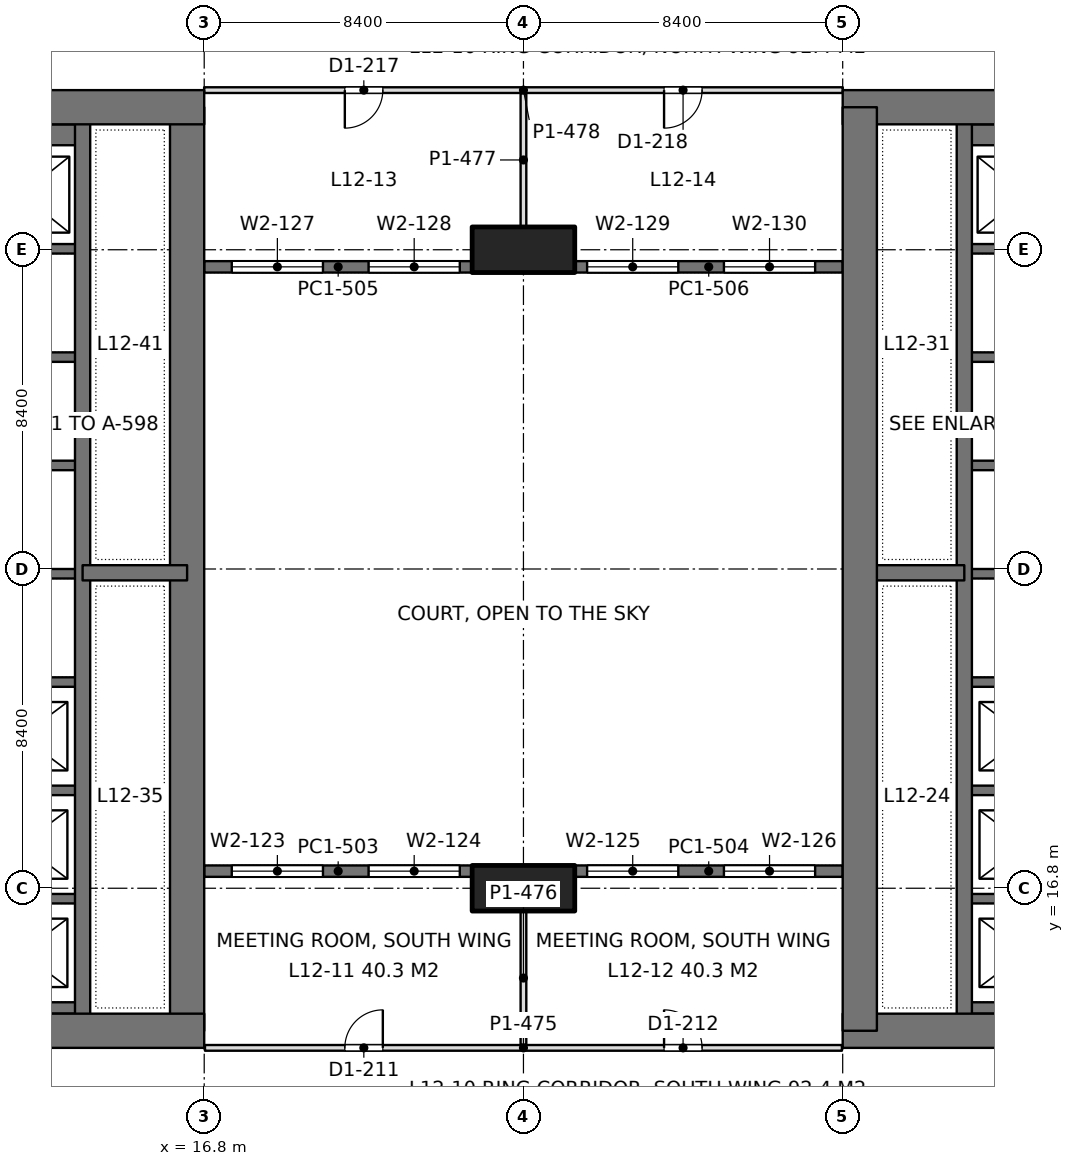
"""IFC4 building model, lengths in metres.
Left out: names, types, materials, properties, quantities, classifications, styles, units other than length and angle.
Written with IfcOpenShell. Run it as: python <this file> out.ifc"""

import sys

from ifc_helpers import new_model, si_unit, direction, frame, frame_2d, origin, origin_2d, place, context, subcontext, project, spatial, rectangle, extrude, element, fill, save


model = new_model("IFC4")
c1 = context("Model", 3, precision=1e-05, world=origin(), true_north=direction((0.0, 1.0)))
c2 = subcontext(c1, "Body", "Model", "MODEL_VIEW")
j1 = project(units=[si_unit("LENGTHUNIT", "METRE"), si_unit("PLANEANGLEUNIT", "RADIAN")], contexts=[c1])
p1 = place(None, origin())
s1 = spatial("IfcSite", under=j1, at=p1, CompositionType="ELEMENT")
p2 = place(p1, origin())
s2 = spatial("IfcBuilding", under=s1, at=p2, CompositionType="ELEMENT")
p3 = place(p2, frame((0.0, 0.0, 54.9)))
s3 = spatial("IfcBuildingStorey", under=s2, at=p3, CompositionType="ELEMENT", Elevation=54.9)
for number, where, z_axis, x_axis in (
    (1, (25.2, 16.8, 0.0), (0.0, 0.0, 1.0), (1.0, 0.0, 0.0)),
    (2, (25.2, 33.6, 0.0), (0.0, 0.0, 1.0), (1.0, 0.0, 0.0)),
):
    element("IfcColumn", number, at=place(p3, frame(where, z_axis=z_axis, x_axis=x_axis)), inside=s3, PredefinedType="COLUMN", context=c2, shape_type="SweptSolid", body=[
        extrude(rectangle(XDim=2.7, YDim=1.2, at=origin_2d()), origin(), (0.0, 0.0, 1.0), 4.5),
    ])
p4 = place(p3, frame((-1.2, 13.05, 0.0), z_axis=(0.0, 0.0, 1.0), x_axis=(1.0, 0.0, 0.0)))
e3 = element("IfcWall", 3, at=p4, inside=s3, PredefinedType="SHEAR", context=c2, shape_type="SweptSolid", body=[
    extrude(rectangle(XDim=18.0, YDim=0.9, at=frame_2d((9.0, 0.0))), origin(), (0.0, 0.0, 1.0), 4.5),
])
p5 = place(p4, frame((8.95, 0.0, 0.0)))
e4 = element("IfcOpeningElement", 4, at=p5, cuts=e3, PredefinedType="OPENING", context=c2, shape_type="SweptSolid", body=[
    extrude(rectangle(XDim=1.8, YDim=2.4, at=frame_2d((0.9, 1.2))), frame((0.0, 0.46, 0.0), z_axis=(0.0, -1.0, 0.0), x_axis=(1.0, 0.0, 0.0)), (0.0, 0.0, 1.0), 0.92),
])
p6 = place(p3, frame((-1.2, 37.35, 0.0), z_axis=(0.0, 0.0, 1.0), x_axis=(1.0, 0.0, 0.0)))
e5 = element("IfcWall", 5, at=p6, inside=s3, PredefinedType="SHEAR", context=c2, shape_type="SweptSolid", body=[
    extrude(rectangle(XDim=18.0, YDim=0.9, at=frame_2d((9.0, 0.0))), origin(), (0.0, 0.0, 1.0), 4.5),
])
p7 = place(p6, frame((8.95, 0.0, 0.0)))
e6 = element("IfcOpeningElement", 6, at=p7, cuts=e5, PredefinedType="OPENING", context=c2, shape_type="SweptSolid", body=[
    extrude(rectangle(XDim=1.8, YDim=2.4, at=frame_2d((0.9, 1.2))), frame((0.0, 0.46, 0.0), z_axis=(0.0, -1.0, 0.0), x_axis=(1.0, 0.0, 0.0)), (0.0, 0.0, 1.0), 0.92),
])
p8 = place(p3, frame((16.35, 13.05, 0.0), z_axis=(0.0, 0.0, 1.0), x_axis=(0.0, 1.0, 0.0)))
e7 = element("IfcWall", 7, at=p8, inside=s3, PredefinedType="SHEAR", context=c2, shape_type="SweptSolid", body=[
    extrude(rectangle(XDim=24.3, YDim=0.9, at=frame_2d((12.15, 0.0))), origin(), (0.0, 0.0, 1.0), 4.5),
])
p9 = place(p3, frame((13.6, 13.05, 0.0), z_axis=(0.0, 0.0, 1.0), x_axis=(0.0, 1.0, 0.0)))
e8 = element("IfcWall", 8, at=p9, inside=s3, PredefinedType="SHEAR", context=c2, shape_type="SweptSolid", body=[
    extrude(rectangle(XDim=24.3, YDim=0.4, at=frame_2d((12.15, 0.0))), origin(), (0.0, 0.0, 1.0), 4.5),
])
p10 = place(p3, frame((13.6, 25.1, 0.0), z_axis=(0.0, 0.0, 1.0), x_axis=(1.0, 0.0, 0.0)))
e9 = element("IfcWall", 9, at=p10, inside=s3, PredefinedType="SHEAR", context=c2, shape_type="SweptSolid", body=[
    extrude(rectangle(XDim=2.75, YDim=0.4, at=frame_2d((1.375, 0.0))), origin(), (0.0, 0.0, 1.0), 4.5),
])
p11 = place(p3, frame((10.4, 13.65, 0.0), z_axis=(0.0, 0.0, 1.0), x_axis=(1.0, 0.0, 0.0)))
e10 = element("IfcWall", 10, at=p11, inside=s3, PredefinedType="SHEAR", context=c2, shape_type="SweptSolid", body=[
    extrude(rectangle(XDim=3.2, YDim=0.3, at=frame_2d((1.6, 0.0))), origin(), (0.0, 0.0, 1.0), 4.5),
])
for number, where, z_axis, x_axis in (
    (11, (10.4, 16.525, 0.0), (0.0, 0.0, 1.0), (1.0, 0.0, 0.0)),
    (12, (10.4, 19.375, 0.0), (0.0, 0.0, 1.0), (1.0, 0.0, 0.0)),
    (13, (10.4, 22.225, 0.0), (0.0, 0.0, 1.0), (1.0, 0.0, 0.0)),
    (14, (10.4, 25.075, 0.0), (0.0, 0.0, 1.0), (1.0, 0.0, 0.0)),
    (15, (10.4, 27.925, 0.0), (0.0, 0.0, 1.0), (1.0, 0.0, 0.0)),
    (16, (10.4, 30.775, 0.0), (0.0, 0.0, 1.0), (1.0, 0.0, 0.0)),
    (17, (10.4, 33.625, 0.0), (0.0, 0.0, 1.0), (1.0, 0.0, 0.0)),
):
    element("IfcWall", number, at=place(p3, frame(where, z_axis=z_axis, x_axis=x_axis)), inside=s3, PredefinedType="SHEAR", context=c2, shape_type="SweptSolid", body=[
        extrude(rectangle(XDim=3.2, YDim=0.25, at=frame_2d((1.6, 0.0))), origin(), (0.0, 0.0, 1.0), 4.5),
    ])
p12 = place(p3, frame((10.4, 36.625, 0.0), z_axis=(0.0, 0.0, 1.0), x_axis=(1.0, 0.0, 0.0)))
e18 = element("IfcWall", 18, at=p12, inside=s3, PredefinedType="SHEAR", context=c2, shape_type="SweptSolid", body=[
    extrude(rectangle(XDim=3.2, YDim=0.55, at=frame_2d((1.6, 0.0))), origin(), (0.0, 0.0, 1.0), 4.5),
])
p13 = place(p3, frame((33.6, 13.05, 0.0), z_axis=(0.0, 0.0, 1.0), x_axis=(1.0, 0.0, 0.0)))
e19 = element("IfcWall", 19, at=p13, inside=s3, PredefinedType="SHEAR", context=c2, shape_type="SweptSolid", body=[
    extrude(rectangle(XDim=18.0, YDim=0.9, at=frame_2d((9.0, 0.0))), origin(), (0.0, 0.0, 1.0), 4.5),
])
p14 = place(p13, frame((7.25, 0.0, 0.0)))
e20 = element("IfcOpeningElement", 20, at=p14, cuts=e19, PredefinedType="OPENING", context=c2, shape_type="SweptSolid", body=[
    extrude(rectangle(XDim=1.8, YDim=2.4, at=frame_2d((0.9, 1.2))), frame((0.0, 0.46, 0.0), z_axis=(0.0, -1.0, 0.0), x_axis=(1.0, 0.0, 0.0)), (0.0, 0.0, 1.0), 0.92),
])
p15 = place(p3, frame((33.6, 37.35, 0.0), z_axis=(0.0, 0.0, 1.0), x_axis=(1.0, 0.0, 0.0)))
e21 = element("IfcWall", 21, at=p15, inside=s3, PredefinedType="SHEAR", context=c2, shape_type="SweptSolid", body=[
    extrude(rectangle(XDim=18.0, YDim=0.9, at=frame_2d((9.0, 0.0))), origin(), (0.0, 0.0, 1.0), 4.5),
])
p16 = place(p15, frame((7.25, 0.0, 0.0)))
e22 = element("IfcOpeningElement", 22, at=p16, cuts=e21, PredefinedType="OPENING", context=c2, shape_type="SweptSolid", body=[
    extrude(rectangle(XDim=1.8, YDim=2.4, at=frame_2d((0.9, 1.2))), frame((0.0, 0.46, 0.0), z_axis=(0.0, -1.0, 0.0), x_axis=(1.0, 0.0, 0.0)), (0.0, 0.0, 1.0), 0.92),
])
p17 = place(p3, frame((34.05, 13.05, 0.0), z_axis=(0.0, 0.0, 1.0), x_axis=(0.0, 1.0, 0.0)))
e23 = element("IfcWall", 23, at=p17, inside=s3, PredefinedType="SHEAR", context=c2, shape_type="SweptSolid", body=[
    extrude(rectangle(XDim=24.3, YDim=0.9, at=frame_2d((12.15, 0.0))), origin(), (0.0, 0.0, 1.0), 4.5),
])
p18 = place(p3, frame((36.8, 13.05, 0.0), z_axis=(0.0, 0.0, 1.0), x_axis=(0.0, 1.0, 0.0)))
e24 = element("IfcWall", 24, at=p18, inside=s3, PredefinedType="SHEAR", context=c2, shape_type="SweptSolid", body=[
    extrude(rectangle(XDim=24.3, YDim=0.4, at=frame_2d((12.15, 0.0))), origin(), (0.0, 0.0, 1.0), 4.5),
])
p19 = place(p3, frame((36.8, 25.1, 0.0), z_axis=(0.0, 0.0, 1.0), x_axis=(-1.0, 0.0, 0.0)))
e25 = element("IfcWall", 25, at=p19, inside=s3, PredefinedType="SHEAR", context=c2, shape_type="SweptSolid", body=[
    extrude(rectangle(XDim=2.75, YDim=0.4, at=frame_2d((1.375, 0.0))), origin(), (0.0, 0.0, 1.0), 4.5),
])
p20 = place(p3, frame((40.0, 13.65, 0.0), z_axis=(0.0, 0.0, 1.0), x_axis=(-1.0, 0.0, 0.0)))
e26 = element("IfcWall", 26, at=p20, inside=s3, PredefinedType="SHEAR", context=c2, shape_type="SweptSolid", body=[
    extrude(rectangle(XDim=3.2, YDim=0.3, at=frame_2d((1.6, 0.0))), origin(), (0.0, 0.0, 1.0), 4.5),
])
for number, where, z_axis, x_axis in (
    (27, (40.0, 16.525, 0.0), (0.0, 0.0, 1.0), (-1.0, 0.0, 0.0)),
    (28, (40.0, 19.375, 0.0), (0.0, 0.0, 1.0), (-1.0, 0.0, 0.0)),
    (29, (40.0, 22.225, 0.0), (0.0, 0.0, 1.0), (-1.0, 0.0, 0.0)),
    (30, (40.0, 25.075, 0.0), (0.0, 0.0, 1.0), (-1.0, 0.0, 0.0)),
    (31, (40.0, 27.925, 0.0), (0.0, 0.0, 1.0), (-1.0, 0.0, 0.0)),
    (32, (40.0, 30.775, 0.0), (0.0, 0.0, 1.0), (-1.0, 0.0, 0.0)),
    (33, (40.0, 33.625, 0.0), (0.0, 0.0, 1.0), (-1.0, 0.0, 0.0)),
):
    element("IfcWall", number, at=place(p3, frame(where, z_axis=z_axis, x_axis=x_axis)), inside=s3, PredefinedType="SHEAR", context=c2, shape_type="SweptSolid", body=[
        extrude(rectangle(XDim=3.2, YDim=0.25, at=frame_2d((1.6, 0.0))), origin(), (0.0, 0.0, 1.0), 4.5),
    ])
p21 = place(p3, frame((40.0, 36.625, 0.0), z_axis=(0.0, 0.0, 1.0), x_axis=(-1.0, 0.0, 0.0)))
e34 = element("IfcWall", 34, at=p21, inside=s3, PredefinedType="SHEAR", context=c2, shape_type="SweptSolid", body=[
    extrude(rectangle(XDim=3.2, YDim=0.55, at=frame_2d((1.6, 0.0))), origin(), (0.0, 0.0, 1.0), 4.5),
])
p22 = place(p3, frame((16.8, 17.25, 0.0), z_axis=(0.0, 0.0, 1.0), x_axis=(1.0, 0.0, 0.0)))
e35 = element("IfcWall", 35, at=p22, inside=s3, PredefinedType="SOLIDWALL", context=c2, shape_type="SweptSolid", body=[
    extrude(rectangle(XDim=7.05, YDim=0.3, at=frame_2d((3.525, 0.0))), origin(), (0.0, 0.0, 1.0), 4.34),
])
p23 = place(p22, frame((0.725, 0.0, 0.9)))
e36 = element("IfcOpeningElement", 36, at=p23, cuts=e35, PredefinedType="OPENING", context=c2, shape_type="SweptSolid", body=[
    extrude(rectangle(XDim=2.4, YDim=1.9, at=frame_2d((1.2, 0.95))), frame((0.0, 0.16, 0.0), z_axis=(0.0, -1.0, 0.0), x_axis=(1.0, 0.0, 0.0)), (0.0, 0.0, 1.0), 0.32),
])
p24 = place(p22, frame((4.325, 0.0, 0.9)))
e37 = element("IfcOpeningElement", 37, at=p24, cuts=e35, PredefinedType="OPENING", context=c2, shape_type="SweptSolid", body=[
    extrude(rectangle(XDim=2.4, YDim=1.9, at=frame_2d((1.2, 0.95))), frame((0.0, 0.16, 0.0), z_axis=(0.0, -1.0, 0.0), x_axis=(1.0, 0.0, 0.0)), (0.0, 0.0, 1.0), 0.32),
])
p25 = place(p3, frame((26.55, 17.25, 0.0), z_axis=(0.0, 0.0, 1.0), x_axis=(1.0, 0.0, 0.0)))
e38 = element("IfcWall", 38, at=p25, inside=s3, PredefinedType="SOLIDWALL", context=c2, shape_type="SweptSolid", body=[
    extrude(rectangle(XDim=7.05, YDim=0.3, at=frame_2d((3.525, 0.0))), origin(), (0.0, 0.0, 1.0), 4.34),
])
p26 = place(p25, frame((0.325, 0.0, 0.9)))
e39 = element("IfcOpeningElement", 39, at=p26, cuts=e38, PredefinedType="OPENING", context=c2, shape_type="SweptSolid", body=[
    extrude(rectangle(XDim=2.4, YDim=1.9, at=frame_2d((1.2, 0.95))), frame((0.0, 0.16, 0.0), z_axis=(0.0, -1.0, 0.0), x_axis=(1.0, 0.0, 0.0)), (0.0, 0.0, 1.0), 0.32),
])
p27 = place(p25, frame((3.925, 0.0, 0.9)))
e40 = element("IfcOpeningElement", 40, at=p27, cuts=e38, PredefinedType="OPENING", context=c2, shape_type="SweptSolid", body=[
    extrude(rectangle(XDim=2.4, YDim=1.9, at=frame_2d((1.2, 0.95))), frame((0.0, 0.16, 0.0), z_axis=(0.0, -1.0, 0.0), x_axis=(1.0, 0.0, 0.0)), (0.0, 0.0, 1.0), 0.32),
])
p28 = place(p3, frame((16.8, 33.15, 0.0), z_axis=(0.0, 0.0, 1.0), x_axis=(1.0, 0.0, 0.0)))
e41 = element("IfcWall", 41, at=p28, inside=s3, PredefinedType="SOLIDWALL", context=c2, shape_type="SweptSolid", body=[
    extrude(rectangle(XDim=7.05, YDim=0.3, at=frame_2d((3.525, 0.0))), origin(), (0.0, 0.0, 1.0), 4.34),
])
p29 = place(p28, frame((0.725, 0.0, 0.9)))
e42 = element("IfcOpeningElement", 42, at=p29, cuts=e41, PredefinedType="OPENING", context=c2, shape_type="SweptSolid", body=[
    extrude(rectangle(XDim=2.4, YDim=1.9, at=frame_2d((1.2, 0.95))), frame((0.0, 0.16, 0.0), z_axis=(0.0, -1.0, 0.0), x_axis=(1.0, 0.0, 0.0)), (0.0, 0.0, 1.0), 0.32),
])
p30 = place(p28, frame((4.325, 0.0, 0.9)))
e43 = element("IfcOpeningElement", 43, at=p30, cuts=e41, PredefinedType="OPENING", context=c2, shape_type="SweptSolid", body=[
    extrude(rectangle(XDim=2.4, YDim=1.9, at=frame_2d((1.2, 0.95))), frame((0.0, 0.16, 0.0), z_axis=(0.0, -1.0, 0.0), x_axis=(1.0, 0.0, 0.0)), (0.0, 0.0, 1.0), 0.32),
])
p31 = place(p3, frame((26.55, 33.15, 0.0), z_axis=(0.0, 0.0, 1.0), x_axis=(1.0, 0.0, 0.0)))
e44 = element("IfcWall", 44, at=p31, inside=s3, PredefinedType="SOLIDWALL", context=c2, shape_type="SweptSolid", body=[
    extrude(rectangle(XDim=7.05, YDim=0.3, at=frame_2d((3.525, 0.0))), origin(), (0.0, 0.0, 1.0), 4.34),
])
p32 = place(p31, frame((0.325, 0.0, 0.9)))
e45 = element("IfcOpeningElement", 45, at=p32, cuts=e44, PredefinedType="OPENING", context=c2, shape_type="SweptSolid", body=[
    extrude(rectangle(XDim=2.4, YDim=1.9, at=frame_2d((1.2, 0.95))), frame((0.0, 0.16, 0.0), z_axis=(0.0, -1.0, 0.0), x_axis=(1.0, 0.0, 0.0)), (0.0, 0.0, 1.0), 0.32),
])
p33 = place(p31, frame((3.925, 0.0, 0.9)))
e46 = element("IfcOpeningElement", 46, at=p33, cuts=e44, PredefinedType="OPENING", context=c2, shape_type="SweptSolid", body=[
    extrude(rectangle(XDim=2.4, YDim=1.9, at=frame_2d((1.2, 0.95))), frame((0.0, 0.16, 0.0), z_axis=(0.0, -1.0, 0.0), x_axis=(1.0, 0.0, 0.0)), (0.0, 0.0, 1.0), 0.32),
])
p34 = place(p3, frame((25.2, 12.674, 0.0), z_axis=(0.0, 0.0, 1.0), x_axis=(0.0, 1.0, 0.0)))
e47 = element("IfcWall", 47, at=p34, inside=s3, PredefinedType="PARTITIONING", context=c2, shape_type="SweptSolid", body=[
    extrude(rectangle(XDim=3.527, YDim=0.15, at=frame_2d((1.763, 0.0))), origin(), (0.0, 0.0, 1.0), 3.74),
])
p35 = place(p3, frame((16.82, 12.6, 0.0), z_axis=(0.0, 0.0, 1.0), x_axis=(1.0, 0.0, 0.0)))
e48 = element("IfcWall", 48, at=p35, inside=s3, PredefinedType="PARTITIONING", context=c2, shape_type="SweptSolid", body=[
    extrude(rectangle(XDim=16.76, YDim=0.15, at=frame_2d((8.38, 0.0))), origin(), (0.0, 0.0, 1.0), 3.74),
])
p36 = place(p35, frame((3.68, 0.0, 0.0)))
e49 = element("IfcOpeningElement", 49, at=p36, cuts=e48, PredefinedType="OPENING", context=c2, shape_type="SweptSolid", body=[
    extrude(rectangle(XDim=1.0, YDim=2.2, at=frame_2d((0.5, 1.1))), frame((0.0, 0.085, 0.0), z_axis=(0.0, -1.0, 0.0), x_axis=(1.0, 0.0, 0.0)), (0.0, 0.0, 1.0), 0.17),
])
p37 = place(p35, frame((12.08, 0.0, 0.0)))
e50 = element("IfcOpeningElement", 50, at=p37, cuts=e48, PredefinedType="OPENING", context=c2, shape_type="SweptSolid", body=[
    extrude(rectangle(XDim=1.0, YDim=2.2, at=frame_2d((0.5, 1.1))), frame((0.0, 0.085, 0.0), z_axis=(0.0, -1.0, 0.0), x_axis=(1.0, 0.0, 0.0)), (0.0, 0.0, 1.0), 0.17),
])
p38 = place(p3, frame((25.2, 34.199, 0.0), z_axis=(0.0, 0.0, 1.0), x_axis=(0.0, 1.0, 0.0)))
e51 = element("IfcWall", 51, at=p38, inside=s3, PredefinedType="PARTITIONING", context=c2, shape_type="SweptSolid", body=[
    extrude(rectangle(XDim=3.527, YDim=0.15, at=frame_2d((1.764, 0.0))), origin(), (0.0, 0.0, 1.0), 3.74),
])
p39 = place(p3, frame((16.798, 37.8, 0.0), z_axis=(0.0, 0.0, 1.0), x_axis=(1.0, 0.0, 0.0)))
e52 = element("IfcWall", 52, at=p39, inside=s3, PredefinedType="PARTITIONING", context=c2, shape_type="SweptSolid", body=[
    extrude(rectangle(XDim=16.804, YDim=0.15, at=frame_2d((8.402, 0.0))), origin(), (0.0, 0.0, 1.0), 3.74),
])
p40 = place(p39, frame((3.702, 0.0, 0.0)))
e53 = element("IfcOpeningElement", 53, at=p40, cuts=e52, PredefinedType="OPENING", context=c2, shape_type="SweptSolid", body=[
    extrude(rectangle(XDim=1.0, YDim=2.2, at=frame_2d((0.5, 1.1))), frame((0.0, 0.085, 0.0), z_axis=(0.0, -1.0, 0.0), x_axis=(1.0, 0.0, 0.0)), (0.0, 0.0, 1.0), 0.17),
])
p41 = place(p39, frame((12.102, 0.0, 0.0)))
e54 = element("IfcOpeningElement", 54, at=p41, cuts=e52, PredefinedType="OPENING", context=c2, shape_type="SweptSolid", body=[
    extrude(rectangle(XDim=1.0, YDim=2.2, at=frame_2d((0.5, 1.1))), frame((0.0, 0.085, 0.0), z_axis=(0.0, -1.0, 0.0), x_axis=(1.0, 0.0, 0.0)), (0.0, 0.0, 1.0), 0.17),
])
p42 = place(p23, origin())
e55 = element("IfcWindow", 55, at=p42, inside=s3, PartitioningType="SINGLE_PANEL", PredefinedType="WINDOW", context=c2, shape_type="SweptSolid", body=[
    extrude(rectangle(XDim=2.4, YDim=1.9, at=frame_2d((1.2, 0.95))), frame((0.0, 0.03, 0.0), z_axis=(0.0, -1.0, 0.0), x_axis=(1.0, 0.0, 0.0)), (0.0, 0.0, 1.0), 0.06),
])
fill(e36, e55)
p43 = place(p24, origin())
e56 = element("IfcWindow", 56, at=p43, inside=s3, PartitioningType="SINGLE_PANEL", PredefinedType="WINDOW", context=c2, shape_type="SweptSolid", body=[
    extrude(rectangle(XDim=2.4, YDim=1.9, at=frame_2d((1.2, 0.95))), frame((0.0, 0.03, 0.0), z_axis=(0.0, -1.0, 0.0), x_axis=(1.0, 0.0, 0.0)), (0.0, 0.0, 1.0), 0.06),
])
fill(e37, e56)
p44 = place(p26, origin())
e57 = element("IfcWindow", 57, at=p44, inside=s3, PartitioningType="SINGLE_PANEL", PredefinedType="WINDOW", context=c2, shape_type="SweptSolid", body=[
    extrude(rectangle(XDim=2.4, YDim=1.9, at=frame_2d((1.2, 0.95))), frame((0.0, 0.03, 0.0), z_axis=(0.0, -1.0, 0.0), x_axis=(1.0, 0.0, 0.0)), (0.0, 0.0, 1.0), 0.06),
])
fill(e39, e57)
p45 = place(p27, origin())
e58 = element("IfcWindow", 58, at=p45, inside=s3, PartitioningType="SINGLE_PANEL", PredefinedType="WINDOW", context=c2, shape_type="SweptSolid", body=[
    extrude(rectangle(XDim=2.4, YDim=1.9, at=frame_2d((1.2, 0.95))), frame((0.0, 0.03, 0.0), z_axis=(0.0, -1.0, 0.0), x_axis=(1.0, 0.0, 0.0)), (0.0, 0.0, 1.0), 0.06),
])
fill(e40, e58)
p46 = place(p29, origin())
e59 = element("IfcWindow", 59, at=p46, inside=s3, PartitioningType="SINGLE_PANEL", PredefinedType="WINDOW", context=c2, shape_type="SweptSolid", body=[
    extrude(rectangle(XDim=2.4, YDim=1.9, at=frame_2d((1.2, 0.95))), frame((0.0, 0.03, 0.0), z_axis=(0.0, -1.0, 0.0), x_axis=(1.0, 0.0, 0.0)), (0.0, 0.0, 1.0), 0.06),
])
fill(e42, e59)
p47 = place(p30, origin())
e60 = element("IfcWindow", 60, at=p47, inside=s3, PartitioningType="SINGLE_PANEL", PredefinedType="WINDOW", context=c2, shape_type="SweptSolid", body=[
    extrude(rectangle(XDim=2.4, YDim=1.9, at=frame_2d((1.2, 0.95))), frame((0.0, 0.03, 0.0), z_axis=(0.0, -1.0, 0.0), x_axis=(1.0, 0.0, 0.0)), (0.0, 0.0, 1.0), 0.06),
])
fill(e43, e60)
p48 = place(p32, origin())
e61 = element("IfcWindow", 61, at=p48, inside=s3, PartitioningType="SINGLE_PANEL", PredefinedType="WINDOW", context=c2, shape_type="SweptSolid", body=[
    extrude(rectangle(XDim=2.4, YDim=1.9, at=frame_2d((1.2, 0.95))), frame((0.0, 0.03, 0.0), z_axis=(0.0, -1.0, 0.0), x_axis=(1.0, 0.0, 0.0)), (0.0, 0.0, 1.0), 0.06),
])
fill(e45, e61)
p49 = place(p33, origin())
e62 = element("IfcWindow", 62, at=p49, inside=s3, PartitioningType="SINGLE_PANEL", PredefinedType="WINDOW", context=c2, shape_type="SweptSolid", body=[
    extrude(rectangle(XDim=2.4, YDim=1.9, at=frame_2d((1.2, 0.95))), frame((0.0, 0.03, 0.0), z_axis=(0.0, -1.0, 0.0), x_axis=(1.0, 0.0, 0.0)), (0.0, 0.0, 1.0), 0.06),
])
fill(e46, e62)
p50 = place(p36, origin())
e63 = element("IfcDoor", 63, at=p50, inside=s3, OperationType="SINGLE_SWING_RIGHT", PredefinedType="DOOR", context=c2, shape_type="SweptSolid", body=[
    extrude(rectangle(XDim=1.0, YDim=2.2, at=frame_2d((0.5, 1.1))), frame((0.0, 0.025, 0.0), z_axis=(0.0, -1.0, 0.0), x_axis=(1.0, 0.0, 0.0)), (0.0, 0.0, 1.0), 0.05),
])
fill(e49, e63)
p51 = place(p37, origin())
e64 = element("IfcDoor", 64, at=p51, inside=s3, OperationType="SINGLE_SWING_LEFT", PredefinedType="DOOR", context=c2, shape_type="SweptSolid", body=[
    extrude(rectangle(XDim=1.0, YDim=2.2, at=frame_2d((0.5, 1.1))), frame((0.0, 0.025, 0.0), z_axis=(0.0, -1.0, 0.0), x_axis=(1.0, 0.0, 0.0)), (0.0, 0.0, 1.0), 0.05),
])
fill(e50, e64)
p52 = place(p40, frame((1.0, 0.0, 0.0), z_axis=(0.0, 0.0, 1.0), x_axis=(-1.0, 0.0, 0.0)))
e65 = element("IfcDoor", 65, at=p52, inside=s3, OperationType="SINGLE_SWING_RIGHT", PredefinedType="DOOR", context=c2, shape_type="SweptSolid", body=[
    extrude(rectangle(XDim=1.0, YDim=2.2, at=frame_2d((0.5, 1.1))), frame((0.0, 0.025, 0.0), z_axis=(0.0, -1.0, 0.0), x_axis=(1.0, 0.0, 0.0)), (0.0, 0.0, 1.0), 0.05),
])
fill(e53, e65)
p53 = place(p41, frame((1.0, 0.0, 0.0), z_axis=(0.0, 0.0, 1.0), x_axis=(-1.0, 0.0, 0.0)))
e66 = element("IfcDoor", 66, at=p53, inside=s3, OperationType="SINGLE_SWING_RIGHT", PredefinedType="DOOR", context=c2, shape_type="SweptSolid", body=[
    extrude(rectangle(XDim=1.0, YDim=2.2, at=frame_2d((0.5, 1.1))), frame((0.0, 0.025, 0.0), z_axis=(0.0, -1.0, 0.0), x_axis=(1.0, 0.0, 0.0)), (0.0, 0.0, 1.0), 0.05),
])
fill(e54, e66)
save(model, sys.argv[1])
